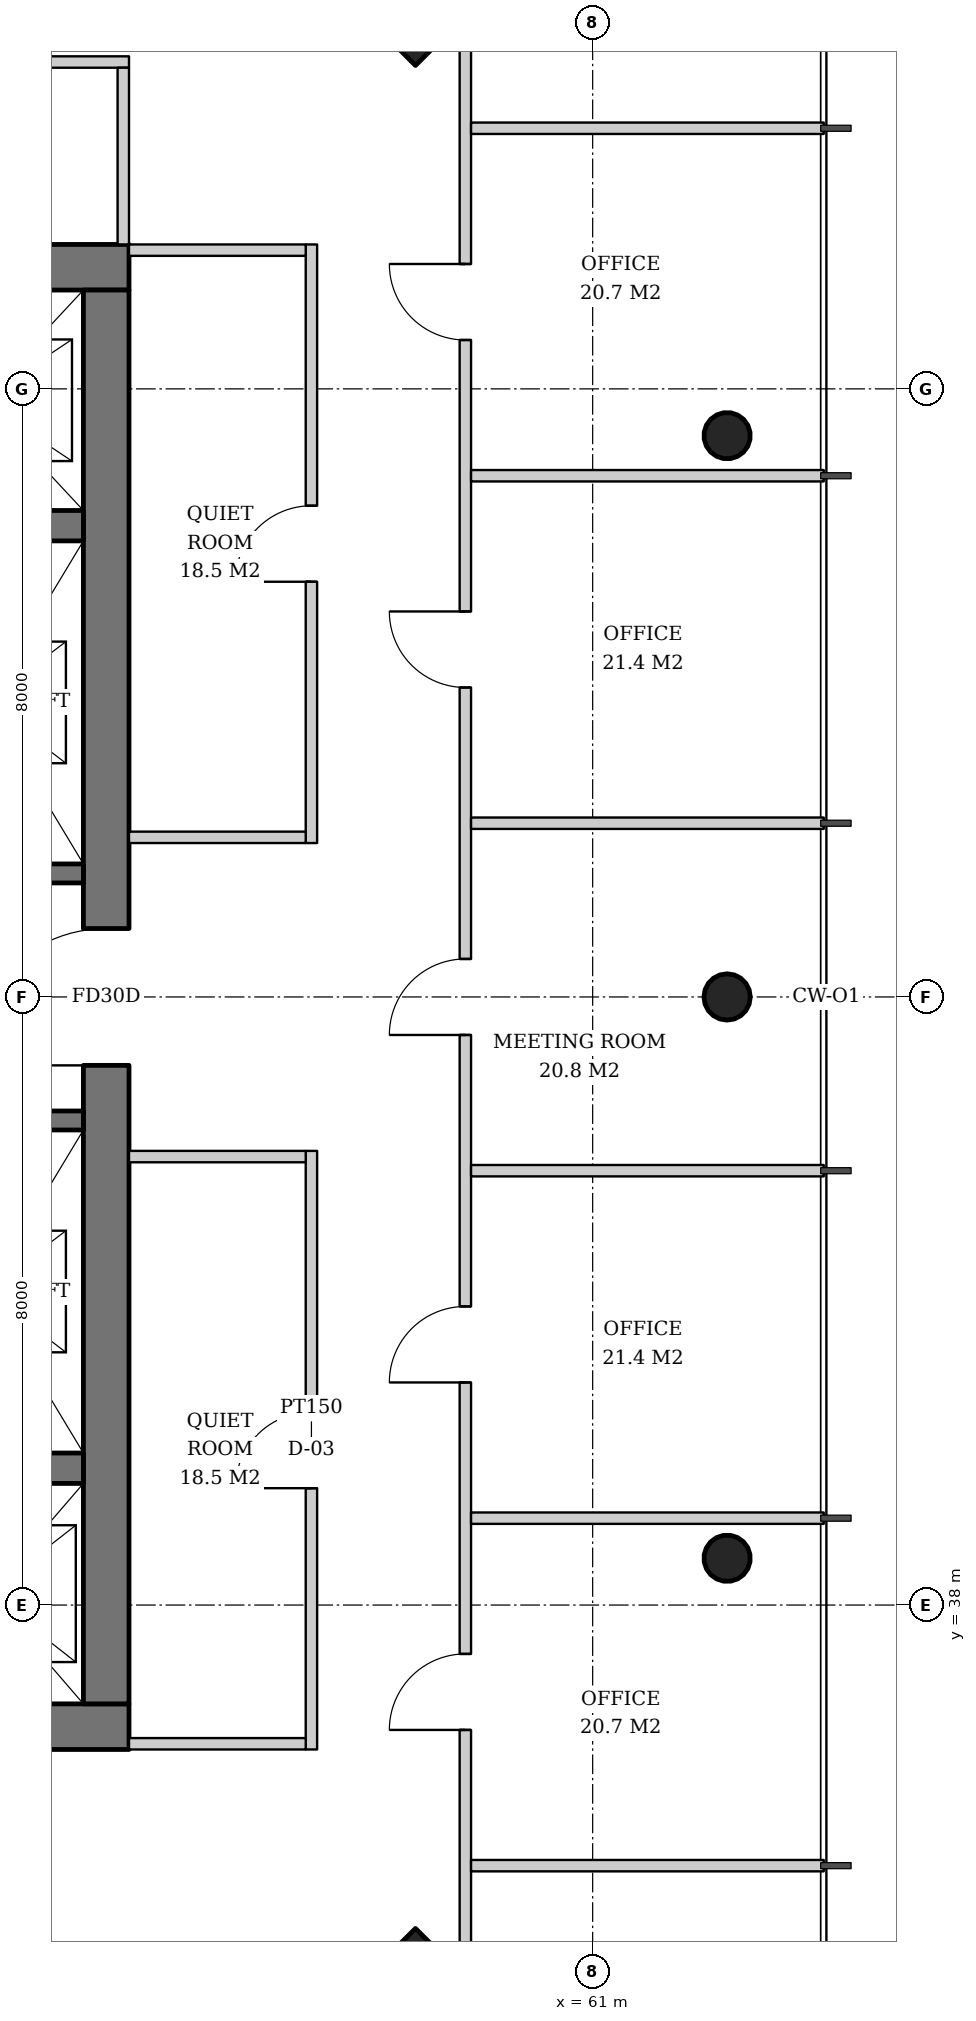
"""IFC4 building model, lengths in metres.
Left out: names, types, materials, properties, quantities, classifications, styles, units other than length and angle.
Written with IfcOpenShell. Run it as: python <this file> out.ifc"""

import sys

from ifc_helpers import new_model, si_unit, direction, frame, frame_2d, origin, origin_2d, place, context, subcontext, project, spatial, rectangle, hollow_circle, extrude, element, fill, save


model = new_model("IFC4")
c1 = context("Model", 3, precision=1e-05, world=origin(), true_north=direction((0.0, 1.0)))
c2 = subcontext(c1, "Body", "Model", "MODEL_VIEW")
j1 = project(units=[si_unit("LENGTHUNIT", "METRE"), si_unit("PLANEANGLEUNIT", "RADIAN")], contexts=[c1])
p1 = place(None, origin())
s1 = spatial("IfcSite", under=j1, at=p1, CompositionType="ELEMENT")
p2 = place(p1, origin())
s2 = spatial("IfcBuilding", under=s1, at=p2, CompositionType="ELEMENT")
p3 = place(p2, frame((0.0, 0.0, 214.8)))
s3 = spatial("IfcBuildingStorey", under=s2, at=p3, CompositionType="ELEMENT", Elevation=214.8)
p4 = place(p3, frame((58.707, 59.707, 0.0), z_axis=(-0.031898107953, -0.031898107953, 0.998981992539), x_axis=(0.707106781187, -0.707106781187, 0.0)))
e1 = element("IfcColumn", 1, at=p4, inside=s3, PredefinedType="COLUMN", context=c2, shape_type="SweptSolid", body=[
    extrude(rectangle(XDim=2.0, YDim=2.0, at=origin_2d()), origin(), (0.0, 0.0, 1.0), 3.804),
])
p5 = place(p3, frame((62.807, 38.596, 0.0), z_axis=(-0.031910269556, 0.015987237665, 0.999362868496), x_axis=(-0.447933021895, -0.894067115991, 0.0)))
e2 = element("IfcColumn", 2, at=p5, inside=s3, PredefinedType="COLUMN", context=c2, shape_type="SweptSolid", body=[
    extrude(hollow_circle(Radius=0.305, WallThickness=0.025, at=origin_2d()), origin(), (0.0, 0.0, 1.0), 3.802),
])
p6 = place(p3, frame((62.807, 46.0, 0.0), z_axis=(-0.031914348339, 0.0, 0.999490607445), x_axis=(0.0, -1.0, 0.0)))
e3 = element("IfcColumn", 3, at=p6, inside=s3, PredefinedType="COLUMN", context=c2, shape_type="SweptSolid", body=[
    extrude(hollow_circle(Radius=0.305, WallThickness=0.025, at=origin_2d()), origin(), (0.0, 0.0, 1.0), 3.802),
])
p7 = place(p3, frame((62.807, 53.404, 0.0), z_axis=(-0.031910269556, -0.015987237665, 0.999362868496), x_axis=(0.447933021895, -0.894067115991, 0.0)))
e4 = element("IfcColumn", 4, at=p7, inside=s3, PredefinedType="COLUMN", context=c2, shape_type="SweptSolid", body=[
    extrude(hollow_circle(Radius=0.305, WallThickness=0.025, at=origin_2d()), origin(), (0.0, 0.0, 1.0), 3.802),
])
p8 = place(p3, frame((58.707, 32.293, 0.0), z_axis=(-0.031898107953, 0.031898107953, 0.998981992539), x_axis=(-0.707106781187, -0.707106781187, 0.0)))
e5 = element("IfcColumn", 5, at=p8, inside=s3, PredefinedType="COLUMN", context=c2, shape_type="SweptSolid", body=[
    extrude(rectangle(XDim=2.0, YDim=2.0, at=origin_2d()), origin(), (0.0, 0.0, 1.0), 3.804),
])
p9 = place(p3, frame((35.1, 36.4, 0.0), z_axis=(0.0, 0.0, 1.0), x_axis=(1.0, 0.0, 0.0)))
e6 = element("IfcWall", 6, at=p9, inside=s3, PredefinedType="SHEAR", context=c2, shape_type="SweptSolid", body=[
    extrude(rectangle(XDim=19.8, YDim=0.6, at=frame_2d((9.9, 0.0))), origin(), (0.0, 0.0, 1.0), 3.8),
])
p10 = place(p9, frame((3.9, 0.0, 0.0)))
e7 = element("IfcOpeningElement", 7, at=p10, cuts=e6, PredefinedType="OPENING", context=c2, shape_type="SweptSolid", body=[
    extrude(rectangle(XDim=1.0, YDim=2.1, at=frame_2d((0.5, 1.05))), frame((0.0, 0.31, 0.0), z_axis=(0.0, -1.0, 0.0), x_axis=(1.0, 0.0, 0.0)), (0.0, 0.0, 1.0), 0.62),
])
p11 = place(p9, frame((15.35, 0.0, 0.0)))
e8 = element("IfcOpeningElement", 8, at=p11, cuts=e6, PredefinedType="OPENING", context=c2, shape_type="SweptSolid", body=[
    extrude(rectangle(XDim=1.0, YDim=2.1, at=frame_2d((0.5, 1.05))), frame((0.0, 0.31, 0.0), z_axis=(0.0, -1.0, 0.0), x_axis=(1.0, 0.0, 0.0)), (0.0, 0.0, 1.0), 0.62),
])
p12 = place(p3, frame((35.1, 55.6, 0.0), z_axis=(0.0, 0.0, 1.0), x_axis=(1.0, 0.0, 0.0)))
e9 = element("IfcWall", 9, at=p12, inside=s3, PredefinedType="SHEAR", context=c2, shape_type="SweptSolid", body=[
    extrude(rectangle(XDim=19.8, YDim=0.6, at=frame_2d((9.9, 0.0))), origin(), (0.0, 0.0, 1.0), 3.8),
])
p13 = place(p12, frame((14.54, 0.0, 0.0)))
e10 = element("IfcOpeningElement", 10, at=p13, cuts=e9, PredefinedType="OPENING", context=c2, shape_type="SweptSolid", body=[
    extrude(rectangle(XDim=1.0, YDim=2.1, at=frame_2d((0.5, 1.05))), frame((0.0, 0.31, 0.0), z_axis=(0.0, -1.0, 0.0), x_axis=(1.0, 0.0, 0.0)), (0.0, 0.0, 1.0), 0.62),
])
p14 = place(p12, frame((1.024, 0.0, 0.0)))
e11 = element("IfcOpeningElement", 11, at=p14, cuts=e9, PredefinedType="OPENING", context=c2, shape_type="SweptSolid", body=[
    extrude(rectangle(XDim=1.0, YDim=2.1, at=frame_2d((0.5, 1.05))), frame((0.0, 0.31, 0.0), z_axis=(0.0, -1.0, 0.0), x_axis=(1.0, 0.0, 0.0)), (0.0, 0.0, 1.0), 0.62),
])
p15 = place(p12, frame((3.262, 0.0, 0.0)))
e12 = element("IfcOpeningElement", 12, at=p15, cuts=e9, PredefinedType="OPENING", context=c2, shape_type="SweptSolid", body=[
    extrude(rectangle(XDim=1.0, YDim=2.1, at=frame_2d((0.5, 1.05))), frame((0.0, 0.31, 0.0), z_axis=(0.0, -1.0, 0.0), x_axis=(1.0, 0.0, 0.0)), (0.0, 0.0, 1.0), 0.62),
])
p16 = place(p3, frame((54.6, 36.7, 0.0), z_axis=(0.0, 0.0, 1.0), x_axis=(0.0, 1.0, 0.0)))
e13 = element("IfcWall", 13, at=p16, inside=s3, PredefinedType="SHEAR", context=c2, shape_type="SweptSolid", body=[
    extrude(rectangle(XDim=18.6, YDim=0.6, at=frame_2d((9.3, 0.0))), origin(), (0.0, 0.0, 1.0), 3.8),
])
p17 = place(p16, frame((8.4, 0.0, 0.0)))
e14 = element("IfcOpeningElement", 14, at=p17, cuts=e13, PredefinedType="OPENING", context=c2, shape_type="SweptSolid", body=[
    extrude(rectangle(XDim=1.8, YDim=2.4, at=frame_2d((0.9, 1.2))), frame((0.0, 0.31, 0.0), z_axis=(0.0, -1.0, 0.0), x_axis=(1.0, 0.0, 0.0)), (0.0, 0.0, 1.0), 0.62),
])
for number, where, z_axis, x_axis in (
    (15, (35.7, 39.8, 0.0), (0.0, 0.0, 1.0), (1.0, 0.0, 0.0)),
    (16, (35.7, 52.2, 0.0), (0.0, 0.0, 1.0), (1.0, 0.0, 0.0)),
):
    element("IfcWall", number, at=place(p3, frame(where, z_axis=z_axis, x_axis=x_axis)), inside=s3, PredefinedType="SHEAR", context=c2, shape_type="SweptSolid", body=[
        extrude(rectangle(XDim=18.6, YDim=0.4, at=frame_2d((9.3, 0.0))), origin(), (0.0, 0.0, 1.0), 3.8),
    ])
for number, where, z_axis, x_axis in (
    (17, (48.93, 47.625, 0.0), (0.0, 0.0, 1.0), (1.0, 0.0, 0.0)),
    (18, (48.93, 44.375, 0.0), (0.0, 0.0, 1.0), (1.0, 0.0, 0.0)),
):
    element("IfcWall", number, at=place(p3, frame(where, z_axis=z_axis, x_axis=x_axis)), inside=s3, PredefinedType="SHEAR", context=c2, shape_type="SweptSolid", body=[
        extrude(rectangle(XDim=5.37, YDim=0.25, at=frame_2d((2.685, 0.0))), origin(), (0.0, 0.0, 1.0), 3.8),
    ])
p18 = place(p3, frame((57.3, 36.1, 0.0), z_axis=(0.0, 0.0, 1.0), x_axis=(0.0, 1.0, 0.0)))
e19 = element("IfcWall", 19, at=p18, inside=s3, PredefinedType="PARTITIONING", context=c2, shape_type="SweptSolid", body=[
    extrude(rectangle(XDim=7.875, YDim=0.15, at=frame_2d((3.938, 0.0))), origin(), (0.0, 0.0, 1.0), 2.867),
])
p19 = place(p18, frame((3.438, 0.0, 0.0)))
e20 = element("IfcOpeningElement", 20, at=p19, cuts=e19, PredefinedType="OPENING", context=c2, shape_type="SweptSolid", body=[
    extrude(rectangle(XDim=1.0, YDim=2.1, at=frame_2d((0.5, 1.05))), frame((0.0, 0.085, 0.0), z_axis=(0.0, -1.0, 0.0), x_axis=(1.0, 0.0, 0.0)), (0.0, 0.0, 1.0), 0.17),
])
p20 = place(p3, frame((54.9, 36.175, 0.0), z_axis=(0.0, 0.0, 1.0), x_axis=(1.0, 0.0, 0.0)))
e21 = element("IfcWall", 21, at=p20, inside=s3, PredefinedType="PARTITIONING", context=c2, shape_type="SweptSolid", body=[
    extrude(rectangle(XDim=2.325, YDim=0.15, at=frame_2d((1.163, 0.0))), origin(), (0.0, 0.0, 1.0), 2.92),
])
p21 = place(p3, frame((54.9, 43.9, 0.0), z_axis=(0.0, 0.0, 1.0), x_axis=(1.0, 0.0, 0.0)))
e22 = element("IfcWall", 22, at=p21, inside=s3, PredefinedType="PARTITIONING", context=c2, shape_type="SweptSolid", body=[
    extrude(rectangle(XDim=2.325, YDim=0.15, at=frame_2d((1.163, 0.0))), origin(), (0.0, 0.0, 1.0), 3.62),
])
p22 = place(p3, frame((57.3, 48.025, 0.0), z_axis=(0.0, 0.0, 1.0), x_axis=(0.0, 1.0, 0.0)))
e23 = element("IfcWall", 23, at=p22, inside=s3, PredefinedType="PARTITIONING", context=c2, shape_type="SweptSolid", body=[
    extrude(rectangle(XDim=7.875, YDim=0.15, at=frame_2d((3.938, 0.0))), origin(), (0.0, 0.0, 1.0), 2.867),
])
p23 = place(p22, frame((3.438, 0.0, 0.0)))
e24 = element("IfcOpeningElement", 24, at=p23, cuts=e23, PredefinedType="OPENING", context=c2, shape_type="SweptSolid", body=[
    extrude(rectangle(XDim=1.0, YDim=2.1, at=frame_2d((0.5, 1.05))), frame((0.0, 0.085, 0.0), z_axis=(0.0, -1.0, 0.0), x_axis=(1.0, 0.0, 0.0)), (0.0, 0.0, 1.0), 0.17),
])
for number, where, z_axis, x_axis in (
    (25, (54.9, 48.1, 0.0), (0.0, 0.0, 1.0), (1.0, 0.0, 0.0)),
    (26, (54.9, 55.825, 0.0), (0.0, 0.0, 1.0), (1.0, 0.0, 0.0)),
):
    element("IfcWall", number, at=place(p3, frame(where, z_axis=z_axis, x_axis=x_axis)), inside=s3, PredefinedType="PARTITIONING", context=c2, shape_type="SweptSolid", body=[
        extrude(rectangle(XDim=2.325, YDim=0.15, at=frame_2d((1.163, 0.0))), origin(), (0.0, 0.0, 1.0), 3.62),
    ])
p24 = place(p3, frame((54.9, 58.3, 0.0), z_axis=(0.0, 0.0, 1.0), x_axis=(-1.0, 0.0, 0.0)))
e27 = element("IfcWall", 27, at=p24, inside=s3, PredefinedType="PARTITIONING", context=c2, shape_type="SweptSolid", body=[
    extrude(rectangle(XDim=3.135, YDim=0.15, at=frame_2d((1.567, 0.0))), origin(), (0.0, 0.0, 1.0), 2.92),
])
p25 = place(p24, frame((1.067, 0.0, 0.0)))
e28 = element("IfcOpeningElement", 28, at=p25, cuts=e27, PredefinedType="OPENING", context=c2, shape_type="SweptSolid", body=[
    extrude(rectangle(XDim=1.0, YDim=2.1, at=frame_2d((0.5, 1.05))), frame((0.0, 0.085, 0.0), z_axis=(0.0, -1.0, 0.0), x_axis=(1.0, 0.0, 0.0)), (0.0, 0.0, 1.0), 0.17),
])
p26 = place(p3, frame((54.825, 55.9, 0.0), z_axis=(0.0, 0.0, 1.0), x_axis=(0.0, 1.0, 0.0)))
e29 = element("IfcWall", 29, at=p26, inside=s3, PredefinedType="PARTITIONING", context=c2, shape_type="SweptSolid", body=[
    extrude(rectangle(XDim=2.325, YDim=0.15, at=frame_2d((1.163, 0.0))), origin(), (0.0, 0.0, 1.0), 2.92),
])
p27 = place(p3, frame((59.325, 33.164, 0.0), z_axis=(0.0, 0.0, 1.0), x_axis=(0.0, 1.0, 0.0)))
e30 = element("IfcWall", 30, at=p27, inside=s3, PredefinedType="PARTITIONING", context=c2, shape_type="SweptSolid", body=[
    extrude(rectangle(XDim=25.671, YDim=0.15, at=frame_2d((12.836, 0.0))), origin(), (0.0, 0.0, 1.0), 2.867),
])
p28 = place(p27, frame((3.193, 0.0, 0.0)))
e31 = element("IfcOpeningElement", 31, at=p28, cuts=e30, PredefinedType="OPENING", context=c2, shape_type="SweptSolid", body=[
    extrude(rectangle(XDim=1.0, YDim=2.1, at=frame_2d((0.5, 1.05))), frame((0.0, 0.085, 0.0), z_axis=(0.0, -1.0, 0.0), x_axis=(1.0, 0.0, 0.0)), (0.0, 0.0, 1.0), 0.17),
])
p29 = place(p27, frame((7.764, 0.0, 0.0)))
e32 = element("IfcOpeningElement", 32, at=p29, cuts=e30, PredefinedType="OPENING", context=c2, shape_type="SweptSolid", body=[
    extrude(rectangle(XDim=1.0, YDim=2.1, at=frame_2d((0.5, 1.05))), frame((0.0, 0.085, 0.0), z_axis=(0.0, -1.0, 0.0), x_axis=(1.0, 0.0, 0.0)), (0.0, 0.0, 1.0), 0.17),
])
p30 = place(p27, frame((12.336, 0.0, 0.0)))
e33 = element("IfcOpeningElement", 33, at=p30, cuts=e30, PredefinedType="OPENING", context=c2, shape_type="SweptSolid", body=[
    extrude(rectangle(XDim=1.0, YDim=2.1, at=frame_2d((0.5, 1.05))), frame((0.0, 0.085, 0.0), z_axis=(0.0, -1.0, 0.0), x_axis=(1.0, 0.0, 0.0)), (0.0, 0.0, 1.0), 0.17),
])
p31 = place(p27, frame((16.907, 0.0, 0.0)))
e34 = element("IfcOpeningElement", 34, at=p31, cuts=e30, PredefinedType="OPENING", context=c2, shape_type="SweptSolid", body=[
    extrude(rectangle(XDim=1.0, YDim=2.1, at=frame_2d((0.5, 1.05))), frame((0.0, 0.085, 0.0), z_axis=(0.0, -1.0, 0.0), x_axis=(1.0, 0.0, 0.0)), (0.0, 0.0, 1.0), 0.17),
])
p32 = place(p27, frame((21.479, 0.0, 0.0)))
e35 = element("IfcOpeningElement", 35, at=p32, cuts=e30, PredefinedType="OPENING", context=c2, shape_type="SweptSolid", body=[
    extrude(rectangle(XDim=1.0, YDim=2.1, at=frame_2d((0.5, 1.05))), frame((0.0, 0.085, 0.0), z_axis=(0.0, -1.0, 0.0), x_axis=(1.0, 0.0, 0.0)), (0.0, 0.0, 1.0), 0.17),
])
for number, where, z_axis, x_axis in (
    (36, (59.4, 34.572, 0.0), (0.0, 0.0, 1.0), (1.0, 0.0, 0.0)),
    (37, (59.4, 39.143, 0.0), (0.0, 0.0, 1.0), (1.0, 0.0, 0.0)),
    (38, (59.4, 43.714, 0.0), (0.0, 0.0, 1.0), (1.0, 0.0, 0.0)),
    (39, (59.4, 48.286, 0.0), (0.0, 0.0, 1.0), (1.0, 0.0, 0.0)),
    (40, (59.4, 52.857, 0.0), (0.0, 0.0, 1.0), (1.0, 0.0, 0.0)),
    (41, (59.4, 57.428, 0.0), (0.0, 0.0, 1.0), (1.0, 0.0, 0.0)),
):
    element("IfcWall", number, at=place(p3, frame(where, z_axis=z_axis, x_axis=x_axis)), inside=s3, PredefinedType="PARTITIONING", context=c2, shape_type="SweptSolid", body=[
        extrude(rectangle(XDim=4.64, YDim=0.15, at=frame_2d((2.32, 0.0))), origin(), (0.0, 0.0, 1.0), 3.12),
    ])
p33 = place(p17, origin())
e42 = element("IfcDoor", 42, at=p33, inside=s3, OperationType="DOUBLE_DOOR_SINGLE_SWING", PredefinedType="DOOR", context=c2, shape_type="SweptSolid", body=[
    extrude(rectangle(XDim=1.8, YDim=2.4, at=frame_2d((0.9, 1.2))), frame((0.0, 0.025, 0.0), z_axis=(0.0, -1.0, 0.0), x_axis=(1.0, 0.0, 0.0)), (0.0, 0.0, 1.0), 0.05),
])
fill(e14, e42)
p34 = place(p19, origin())
e43 = element("IfcDoor", 43, at=p34, inside=s3, OperationType="SINGLE_SWING_LEFT", PredefinedType="DOOR", context=c2, shape_type="SweptSolid", body=[
    extrude(rectangle(XDim=1.0, YDim=2.1, at=frame_2d((0.5, 1.05))), frame((0.0, 0.025, 0.0), z_axis=(0.0, -1.0, 0.0), x_axis=(1.0, 0.0, 0.0)), (0.0, 0.0, 1.0), 0.05),
])
fill(e20, e43)
p35 = place(p23, origin())
e44 = element("IfcDoor", 44, at=p35, inside=s3, OperationType="SINGLE_SWING_LEFT", PredefinedType="DOOR", context=c2, shape_type="SweptSolid", body=[
    extrude(rectangle(XDim=1.0, YDim=2.1, at=frame_2d((0.5, 1.05))), frame((0.0, 0.025, 0.0), z_axis=(0.0, -1.0, 0.0), x_axis=(1.0, 0.0, 0.0)), (0.0, 0.0, 1.0), 0.05),
])
fill(e24, e44)
p36 = place(p28, origin())
e45 = element("IfcDoor", 45, at=p36, inside=s3, OperationType="SINGLE_SWING_LEFT", PredefinedType="DOOR", context=c2, shape_type="SweptSolid", body=[
    extrude(rectangle(XDim=1.0, YDim=2.1, at=frame_2d((0.5, 1.05))), frame((0.0, 0.025, 0.0), z_axis=(0.0, -1.0, 0.0), x_axis=(1.0, 0.0, 0.0)), (0.0, 0.0, 1.0), 0.05),
])
fill(e31, e45)
p37 = place(p29, origin())
e46 = element("IfcDoor", 46, at=p37, inside=s3, OperationType="SINGLE_SWING_LEFT", PredefinedType="DOOR", context=c2, shape_type="SweptSolid", body=[
    extrude(rectangle(XDim=1.0, YDim=2.1, at=frame_2d((0.5, 1.05))), frame((0.0, 0.025, 0.0), z_axis=(0.0, -1.0, 0.0), x_axis=(1.0, 0.0, 0.0)), (0.0, 0.0, 1.0), 0.05),
])
fill(e32, e46)
p38 = place(p30, origin())
e47 = element("IfcDoor", 47, at=p38, inside=s3, OperationType="SINGLE_SWING_LEFT", PredefinedType="DOOR", context=c2, shape_type="SweptSolid", body=[
    extrude(rectangle(XDim=1.0, YDim=2.1, at=frame_2d((0.5, 1.05))), frame((0.0, 0.025, 0.0), z_axis=(0.0, -1.0, 0.0), x_axis=(1.0, 0.0, 0.0)), (0.0, 0.0, 1.0), 0.05),
])
fill(e33, e47)
p39 = place(p31, origin())
e48 = element("IfcDoor", 48, at=p39, inside=s3, OperationType="SINGLE_SWING_RIGHT", PredefinedType="DOOR", context=c2, shape_type="SweptSolid", body=[
    extrude(rectangle(XDim=1.0, YDim=2.1, at=frame_2d((0.5, 1.05))), frame((0.0, 0.025, 0.0), z_axis=(0.0, -1.0, 0.0), x_axis=(1.0, 0.0, 0.0)), (0.0, 0.0, 1.0), 0.05),
])
fill(e34, e48)
p40 = place(p32, origin())
e49 = element("IfcDoor", 49, at=p40, inside=s3, OperationType="SINGLE_SWING_RIGHT", PredefinedType="DOOR", context=c2, shape_type="SweptSolid", body=[
    extrude(rectangle(XDim=1.0, YDim=2.1, at=frame_2d((0.5, 1.05))), frame((0.0, 0.025, 0.0), z_axis=(0.0, -1.0, 0.0), x_axis=(1.0, 0.0, 0.0)), (0.0, 0.0, 1.0), 0.05),
])
fill(e35, e49)
save(model, sys.argv[1])
